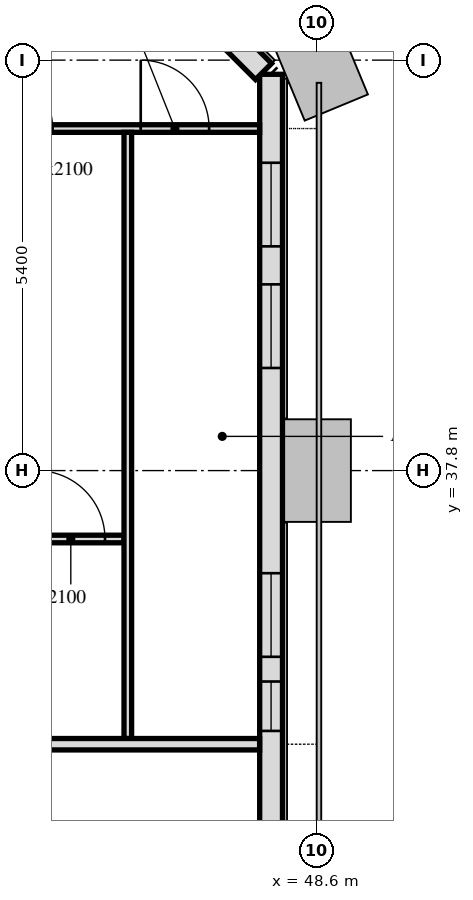
"""IFC4 building model, lengths in metres.
Left out: names, types, materials, properties, quantities, classifications, styles, units other than length and angle.
Written with IfcOpenShell. Run it as: python <this file> out.ifc"""

import sys

from ifc_helpers import new_model, si_unit, direction, frame, frame_2d, origin, place, context, subcontext, project, spatial, rectangle, extrude, element, fill, save


model = new_model("IFC4")
c1 = context("Model", 3, precision=1e-05, world=origin(), true_north=direction((0.0, 1.0)))
c2 = subcontext(c1, "Body", "Model", "MODEL_VIEW")
j1 = project(units=[si_unit("LENGTHUNIT", "METRE"), si_unit("PLANEANGLEUNIT", "RADIAN")], contexts=[c1])
p1 = place(None, origin())
s1 = spatial("IfcSite", under=j1, at=p1, CompositionType="ELEMENT")
p2 = place(p1, origin())
s2 = spatial("IfcBuilding", under=s1, at=p2, CompositionType="ELEMENT")
p3 = place(p2, frame((0.0, 0.0, 304.9)))
s3 = spatial("IfcBuildingStorey", under=s2, at=p3, CompositionType="ELEMENT", Elevation=304.9)
p4 = place(p3, frame((48.0, 10.986, 0.0), z_axis=(0.0, 0.0, 1.0), x_axis=(0.0, 1.0, 0.0)))
e1 = element("IfcWall", 1, at=p4, inside=s3, PredefinedType="SOLIDWALL", context=c2, shape_type="SweptSolid", body=[
    extrude(rectangle(XDim=32.027, YDim=0.3, at=frame_2d((16.014, 0.0))), origin(), (0.0, 0.0, 1.0), 2.8),
])
p5 = place(p4, frame((1.314, 0.0, 0.9)))
e2 = element("IfcOpeningElement", 2, at=p5, cuts=e1, PredefinedType="OPENING", context=c2, shape_type="SweptSolid", body=[
    extrude(rectangle(XDim=1.1, YDim=1.7, at=frame_2d((0.55, 0.85))), frame((0.0, 0.16, 0.0), z_axis=(0.0, -1.0, 0.0), x_axis=(1.0, 0.0, 0.0)), (0.0, 0.0, 1.0), 0.32),
])
p6 = place(p4, frame((2.589, 0.0, 0.9)))
e3 = element("IfcOpeningElement", 3, at=p6, cuts=e1, PredefinedType="OPENING", context=c2, shape_type="SweptSolid", body=[
    extrude(rectangle(XDim=0.65, YDim=1.7, at=frame_2d((0.325, 0.85))), frame((0.0, 0.16, 0.0), z_axis=(0.0, -1.0, 0.0), x_axis=(1.0, 0.0, 0.0)), (0.0, 0.0, 1.0), 0.32),
])
p7 = place(p4, frame((6.214, 0.0, 0.9)))
e4 = element("IfcOpeningElement", 4, at=p7, cuts=e1, PredefinedType="OPENING", context=c2, shape_type="SweptSolid", body=[
    extrude(rectangle(XDim=3.4, YDim=1.7, at=frame_2d((1.7, 0.85))), frame((0.0, 0.16, 0.0), z_axis=(0.0, -1.0, 0.0), x_axis=(1.0, 0.0, 0.0)), (0.0, 0.0, 1.0), 0.32),
])
p8 = place(p4, frame((11.964, 0.0, 0.9)))
e5 = element("IfcOpeningElement", 5, at=p8, cuts=e1, PredefinedType="OPENING", context=c2, shape_type="SweptSolid", body=[
    extrude(rectangle(XDim=1.1, YDim=1.7, at=frame_2d((0.55, 0.85))), frame((0.0, 0.16, 0.0), z_axis=(0.0, -1.0, 0.0), x_axis=(1.0, 0.0, 0.0)), (0.0, 0.0, 1.0), 0.32),
])
p9 = place(p4, frame((13.564, 0.0, 0.9)))
e6 = element("IfcOpeningElement", 6, at=p9, cuts=e1, PredefinedType="OPENING", context=c2, shape_type="SweptSolid", body=[
    extrude(rectangle(XDim=1.1, YDim=1.7, at=frame_2d((0.55, 0.85))), frame((0.0, 0.16, 0.0), z_axis=(0.0, -1.0, 0.0), x_axis=(1.0, 0.0, 0.0)), (0.0, 0.0, 1.0), 0.32),
])
p10 = place(p4, frame((17.014, 0.0, 0.9)))
e7 = element("IfcOpeningElement", 7, at=p10, cuts=e1, PredefinedType="OPENING", context=c2, shape_type="SweptSolid", body=[
    extrude(rectangle(XDim=3.4, YDim=1.7, at=frame_2d((1.7, 0.85))), frame((0.0, 0.16, 0.0), z_axis=(0.0, -1.0, 0.0), x_axis=(1.0, 0.0, 0.0)), (0.0, 0.0, 1.0), 0.32),
])
p11 = place(p4, frame((23.389, 0.0, 0.9)))
e8 = element("IfcOpeningElement", 8, at=p11, cuts=e1, PredefinedType="OPENING", context=c2, shape_type="SweptSolid", body=[
    extrude(rectangle(XDim=0.65, YDim=1.7, at=frame_2d((0.325, 0.85))), frame((0.0, 0.16, 0.0), z_axis=(0.0, -1.0, 0.0), x_axis=(1.0, 0.0, 0.0)), (0.0, 0.0, 1.0), 0.32),
])
p12 = place(p4, frame((24.364, 0.0, 0.9)))
e9 = element("IfcOpeningElement", 9, at=p12, cuts=e1, PredefinedType="OPENING", context=c2, shape_type="SweptSolid", body=[
    extrude(rectangle(XDim=1.1, YDim=1.7, at=frame_2d((0.55, 0.85))), frame((0.0, 0.16, 0.0), z_axis=(0.0, -1.0, 0.0), x_axis=(1.0, 0.0, 0.0)), (0.0, 0.0, 1.0), 0.32),
])
p13 = place(p4, frame((28.164, 0.0, 0.9)))
e10 = element("IfcOpeningElement", 10, at=p13, cuts=e1, PredefinedType="OPENING", context=c2, shape_type="SweptSolid", body=[
    extrude(rectangle(XDim=1.1, YDim=1.7, at=frame_2d((0.55, 0.85))), frame((0.0, 0.16, 0.0), z_axis=(0.0, -1.0, 0.0), x_axis=(1.0, 0.0, 0.0)), (0.0, 0.0, 1.0), 0.32),
])
p14 = place(p4, frame((29.764, 0.0, 0.9)))
e11 = element("IfcOpeningElement", 11, at=p14, cuts=e1, PredefinedType="OPENING", context=c2, shape_type="SweptSolid", body=[
    extrude(rectangle(XDim=1.1, YDim=1.7, at=frame_2d((0.55, 0.85))), frame((0.0, 0.16, 0.0), z_axis=(0.0, -1.0, 0.0), x_axis=(1.0, 0.0, 0.0)), (0.0, 0.0, 1.0), 0.32),
])
p15 = place(p3, frame((47.901, 43.051, 0.0), z_axis=(0.0, 0.0, 1.0), x_axis=(-0.707106781187, 0.707106781187, 0.0)))
e12 = element("IfcWall", 12, at=p15, inside=s3, PredefinedType="SOLIDWALL", context=c2, shape_type="SweptSolid", body=[
    extrude(rectangle(XDim=6.86, YDim=0.3, at=frame_2d((3.43, 0.0))), origin(), (0.0, 0.0, 1.0), 2.8),
])
p16 = place(p15, frame((1.28, 0.0, 0.9)))
e13 = element("IfcOpeningElement", 13, at=p16, cuts=e12, PredefinedType="OPENING", context=c2, shape_type="SweptSolid", body=[
    extrude(rectangle(XDim=1.1, YDim=1.7, at=frame_2d((0.55, 0.85))), frame((0.0, 0.16, 0.0), z_axis=(0.0, -1.0, 0.0), x_axis=(1.0, 0.0, 0.0)), (0.0, 0.0, 1.0), 0.32),
])
p17 = place(p15, frame((4.48, 0.0, 0.9)))
e14 = element("IfcOpeningElement", 14, at=p17, cuts=e12, PredefinedType="OPENING", context=c2, shape_type="SweptSolid", body=[
    extrude(rectangle(XDim=1.1, YDim=1.7, at=frame_2d((0.55, 0.85))), frame((0.0, 0.16, 0.0), z_axis=(0.0, -1.0, 0.0), x_axis=(1.0, 0.0, 0.0)), (0.0, 0.0, 1.0), 0.32),
])
p18 = place(p3, frame((43.185, 42.3, 0.0), z_axis=(0.0, 0.0, 1.0), x_axis=(1.0, 0.0, 0.0)))
e15 = element("IfcWall", 15, at=p18, inside=s3, PredefinedType="PARTITIONING", context=c2, shape_type="SweptSolid", body=[
    extrude(rectangle(XDim=4.664, YDim=0.1, at=frame_2d((2.332, 0.0))), origin(), (0.0, 0.0, 1.0), 2.8),
])
p19 = place(p18, frame((3.1, 0.0, 0.0)))
e16 = element("IfcOpeningElement", 16, at=p19, cuts=e15, PredefinedType="OPENING", context=c2, shape_type="SweptSolid", body=[
    extrude(rectangle(XDim=0.9, YDim=2.1, at=frame_2d((0.45, 1.05))), frame((0.0, 0.05, 0.0), z_axis=(0.0, -1.0, 0.0), x_axis=(1.0, 0.0, 0.0)), (0.0, 0.0, 1.0), 0.1),
])
p20 = place(p18, frame((1.04, 0.0, 0.0)))
e17 = element("IfcOpeningElement", 17, at=p20, cuts=e15, PredefinedType="OPENING", context=c2, shape_type="SweptSolid", body=[
    extrude(rectangle(XDim=0.9, YDim=2.1, at=frame_2d((0.45, 1.05))), frame((0.0, 0.05, 0.0), z_axis=(0.0, -1.0, 0.0), x_axis=(1.0, 0.0, 0.0)), (0.0, 0.0, 1.0), 0.1),
])
p21 = place(p3, frame((40.435, 36.9, 0.0), z_axis=(0.0, 0.0, 1.0), x_axis=(1.0, 0.0, 0.0)))
e18 = element("IfcWall", 18, at=p21, inside=s3, PredefinedType="PARTITIONING", context=c2, shape_type="SweptSolid", body=[
    extrude(rectangle(XDim=5.63, YDim=0.1, at=frame_2d((2.815, 0.0))), origin(), (0.0, 0.0, 1.0), 2.8),
])
p22 = place(p21, frame((4.48, 0.0, 0.0)))
e19 = element("IfcOpeningElement", 19, at=p22, cuts=e18, PredefinedType="OPENING", context=c2, shape_type="SweptSolid", body=[
    extrude(rectangle(XDim=0.9, YDim=2.1, at=frame_2d((0.45, 1.05))), frame((0.0, 0.05, 0.0), z_axis=(0.0, -1.0, 0.0), x_axis=(1.0, 0.0, 0.0)), (0.0, 0.0, 1.0), 0.1),
])
p23 = place(p3, frame((46.115, 34.275, 0.0), z_axis=(0.0, 0.0, 1.0), x_axis=(0.0, 1.0, 0.0)))
e20 = element("IfcWall", 20, at=p23, inside=s3, PredefinedType="PARTITIONING", context=c2, shape_type="SweptSolid", body=[
    extrude(rectangle(XDim=7.975, YDim=0.1, at=frame_2d((3.988, 0.0))), origin(), (0.0, 0.0, 1.0), 2.2),
])
p24 = place(p3, frame((6.151, 34.2, 0.0), z_axis=(0.0, 0.0, 1.0), x_axis=(1.0, 0.0, 0.0)))
e21 = element("IfcWall", 21, at=p24, inside=s3, PredefinedType="PARTITIONING", context=c2, shape_type="SweptSolid", body=[
    extrude(rectangle(XDim=41.698, YDim=0.15, at=frame_2d((20.849, 0.0))), origin(), (0.0, 0.0, 1.0), 2.2),
])
p25 = place(p24, frame((2.939, 0.0, 0.0)))
e22 = element("IfcOpeningElement", 22, at=p25, cuts=e21, PredefinedType="OPENING", context=c2, shape_type="SweptSolid", body=[
    extrude(rectangle(XDim=1.0, YDim=2.1, at=frame_2d((0.5, 1.05))), frame((0.0, 0.075, 0.0), z_axis=(0.0, -1.0, 0.0), x_axis=(1.0, 0.0, 0.0)), (0.0, 0.0, 1.0), 0.15),
])
p26 = place(p24, frame((18.121, 0.0, 0.0)))
e23 = element("IfcOpeningElement", 23, at=p26, cuts=e21, PredefinedType="OPENING", context=c2, shape_type="SweptSolid", body=[
    extrude(rectangle(XDim=1.0, YDim=2.1, at=frame_2d((0.5, 1.05))), frame((0.0, 0.075, 0.0), z_axis=(0.0, -1.0, 0.0), x_axis=(1.0, 0.0, 0.0)), (0.0, 0.0, 1.0), 0.15),
])
p27 = place(p24, frame((32.359, 0.0, 0.0)))
e24 = element("IfcOpeningElement", 24, at=p27, cuts=e21, PredefinedType="OPENING", context=c2, shape_type="SweptSolid", body=[
    extrude(rectangle(XDim=1.0, YDim=2.1, at=frame_2d((0.5, 1.05))), frame((0.0, 0.075, 0.0), z_axis=(0.0, -1.0, 0.0), x_axis=(1.0, 0.0, 0.0)), (0.0, 0.0, 1.0), 0.15),
])
p28 = place(p11, origin())
e25 = element("IfcWindow", 25, at=p28, inside=s3, PartitioningType="SINGLE_PANEL", PredefinedType="WINDOW", context=c2, shape_type="SweptSolid", body=[
    extrude(rectangle(XDim=0.65, YDim=1.7, at=frame_2d((0.325, 0.85))), frame((0.0, 0.03, 0.0), z_axis=(0.0, -1.0, 0.0), x_axis=(1.0, 0.0, 0.0)), (0.0, 0.0, 1.0), 0.06),
])
fill(e8, e25)
p29 = place(p12, origin())
e26 = element("IfcWindow", 26, at=p29, inside=s3, PartitioningType="SINGLE_PANEL", PredefinedType="WINDOW", context=c2, shape_type="SweptSolid", body=[
    extrude(rectangle(XDim=1.1, YDim=1.7, at=frame_2d((0.55, 0.85))), frame((0.0, 0.03, 0.0), z_axis=(0.0, -1.0, 0.0), x_axis=(1.0, 0.0, 0.0)), (0.0, 0.0, 1.0), 0.06),
])
fill(e9, e26)
p30 = place(p13, origin())
e27 = element("IfcWindow", 27, at=p30, inside=s3, PartitioningType="SINGLE_PANEL", PredefinedType="WINDOW", context=c2, shape_type="SweptSolid", body=[
    extrude(rectangle(XDim=1.1, YDim=1.7, at=frame_2d((0.55, 0.85))), frame((0.0, 0.03, 0.0), z_axis=(0.0, -1.0, 0.0), x_axis=(1.0, 0.0, 0.0)), (0.0, 0.0, 1.0), 0.06),
])
fill(e10, e27)
p31 = place(p14, origin())
e28 = element("IfcWindow", 28, at=p31, inside=s3, PartitioningType="SINGLE_PANEL", PredefinedType="WINDOW", context=c2, shape_type="SweptSolid", body=[
    extrude(rectangle(XDim=1.1, YDim=1.7, at=frame_2d((0.55, 0.85))), frame((0.0, 0.03, 0.0), z_axis=(0.0, -1.0, 0.0), x_axis=(1.0, 0.0, 0.0)), (0.0, 0.0, 1.0), 0.06),
])
fill(e11, e28)
p32 = place(p19, origin())
e29 = element("IfcDoor", 29, at=p32, inside=s3, OperationType="SINGLE_SWING_RIGHT", PredefinedType="DOOR", context=c2, shape_type="SweptSolid", body=[
    extrude(rectangle(XDim=0.9, YDim=2.1, at=frame_2d((0.45, 1.05))), frame((0.0, 0.025, 0.0), z_axis=(0.0, -1.0, 0.0), x_axis=(1.0, 0.0, 0.0)), (0.0, 0.0, 1.0), 0.05),
])
fill(e16, e29)
p33 = place(p22, origin())
e30 = element("IfcDoor", 30, at=p33, inside=s3, OperationType="SINGLE_SWING_LEFT", PredefinedType="DOOR", context=c2, shape_type="SweptSolid", body=[
    extrude(rectangle(XDim=0.9, YDim=2.1, at=frame_2d((0.45, 1.05))), frame((0.0, 0.025, 0.0), z_axis=(0.0, -1.0, 0.0), x_axis=(1.0, 0.0, 0.0)), (0.0, 0.0, 1.0), 0.05),
])
fill(e19, e30)
p34 = place(p20, origin())
e31 = element("IfcDoor", 31, at=p34, inside=s3, OperationType="SINGLE_SWING_LEFT", PredefinedType="DOOR", context=c2, shape_type="SweptSolid", body=[
    extrude(rectangle(XDim=0.9, YDim=2.1, at=frame_2d((0.45, 1.05))), frame((0.0, 0.025, 0.0), z_axis=(0.0, -1.0, 0.0), x_axis=(1.0, 0.0, 0.0)), (0.0, 0.0, 1.0), 0.05),
])
fill(e17, e31)
save(model, sys.argv[1])
